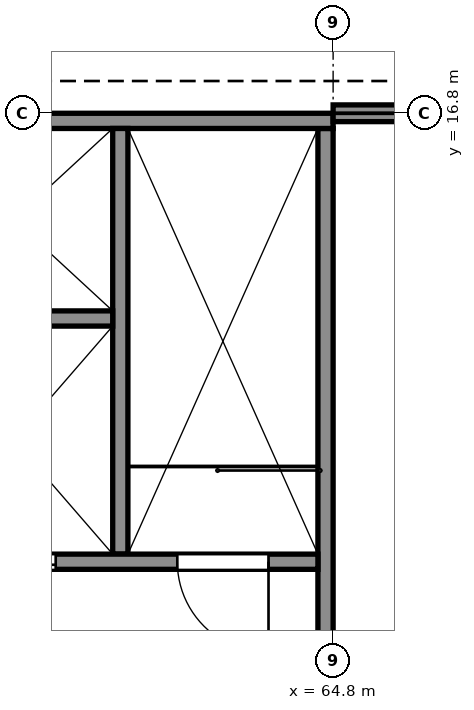
"""IFC4 building model, lengths in metres.
Left out: names, types, materials, properties, quantities, classifications, styles, units other than length and angle.
Written with IfcOpenShell. Run it as: python <this file> out.ifc"""

import sys

from ifc_helpers import new_model, si_unit, direction, frame, frame_2d, origin, place, context, subcontext, project, spatial, polyline, rectangle, outline, extrude, element, fill, save


model = new_model("IFC4")
c1 = context("Model", 3, precision=1e-05, world=origin(), true_north=direction((0.0, 1.0)))
c2 = subcontext(c1, "Body", "Model", "MODEL_VIEW")
j1 = project(units=[si_unit("LENGTHUNIT", "METRE"), si_unit("PLANEANGLEUNIT", "RADIAN")], contexts=[c1])
p1 = place(None, origin())
s1 = spatial("IfcSite", under=j1, at=p1, CompositionType="ELEMENT")
p2 = place(p1, origin())
s2 = spatial("IfcBuilding", under=s1, at=p2, CompositionType="ELEMENT")
p3 = place(p2, frame((0.0, 0.0, 25.0)))
s3 = spatial("IfcBuildingStorey", under=s2, at=p3, CompositionType="ELEMENT", Elevation=25.0)
p4 = place(p3, frame((56.4, 16.7, 0.0), z_axis=(0.0, 0.0, 1.0), x_axis=(1.0, 0.0, 0.0)))
e1 = element("IfcWall", 1, at=p4, inside=s3, PredefinedType="SHEAR", context=c2, shape_type="SweptSolid", body=[
    extrude(rectangle(XDim=8.4, YDim=0.2, at=frame_2d((4.2, 0.0))), origin(), (0.0, 0.0, 1.0), 4.433),
])
p5 = place(p3, frame((64.7, 8.6, 0.0), z_axis=(0.0, 0.0, 1.0), x_axis=(0.0, 1.0, 0.0)))
e2 = element("IfcWall", 2, at=p5, inside=s3, PredefinedType="SHEAR", context=c2, shape_type="SweptSolid", body=[
    extrude(outline(polyline([(0.0, 0.0), (8.0, 0.0), (8.0, 4.465), (7.704, 4.561), (7.407, 4.658), (6.519, 4.946), (6.222, 5.043), (5.333, 5.331), (5.037, 5.428), (4.444, 5.62), (4.148, 5.717), (3.259, 6.005), (2.963, 6.102), (2.074, 6.39), (1.778, 6.487), (1.185, 6.679), (0.889, 6.776), (0.0, 7.064), (0.0, 0.0)])), frame((0.0, 0.1, 0.0), z_axis=(0.0, -1.0, 0.0), x_axis=(1.0, 0.0, 0.0)), (0.0, 0.0, 1.0), 0.2),
])
p6 = place(p3, frame((56.6, 10.9, 0.0), z_axis=(0.0, 0.0, 1.0), x_axis=(1.0, 0.0, 0.0)))
e3 = element("IfcWall", 3, at=p6, inside=s3, PredefinedType="SHEAR", context=c2, shape_type="SweptSolid", body=[
    extrude(rectangle(XDim=8.0, YDim=0.2, at=frame_2d((4.0, 0.0))), origin(), (0.0, 0.0, 1.0), 6.317),
])
p7 = place(p6, frame((0.65, 0.0, 0.0)))
e4 = element("IfcOpeningElement", 4, at=p7, cuts=e3, PredefinedType="OPENING", context=c2, shape_type="SweptSolid", body=[
    extrude(rectangle(XDim=1.2, YDim=2.1, at=frame_2d((0.6, 1.05))), frame((0.0, 0.11, 0.0), z_axis=(0.0, -1.0, 0.0), x_axis=(1.0, 0.0, 0.0)), (0.0, 0.0, 1.0), 0.22),
])
p8 = place(p6, frame((6.15, 0.0, 0.0)))
e5 = element("IfcOpeningElement", 5, at=p8, cuts=e3, PredefinedType="OPENING", context=c2, shape_type="SweptSolid", body=[
    extrude(rectangle(XDim=1.2, YDim=2.1, at=frame_2d((0.6, 1.05))), frame((0.0, 0.11, 0.0), z_axis=(0.0, -1.0, 0.0), x_axis=(1.0, 0.0, 0.0)), (0.0, 0.0, 1.0), 0.22),
])
p9 = place(p6, frame((3.45, 0.0, 0.0)))
e6 = element("IfcOpeningElement", 6, at=p9, cuts=e3, PredefinedType="OPENING", context=c2, shape_type="SweptSolid", body=[
    extrude(rectangle(XDim=1.1, YDim=2.1, at=frame_2d((0.55, 1.05))), frame((0.0, 0.11, 0.0), z_axis=(0.0, -1.0, 0.0), x_axis=(1.0, 0.0, 0.0)), (0.0, 0.0, 1.0), 0.22),
])
p10 = place(p3, frame((62.0, 11.0, 0.0), z_axis=(0.0, 0.0, 1.0), x_axis=(0.0, 1.0, 0.0)))
e7 = element("IfcWall", 7, at=p10, inside=s3, PredefinedType="SHEAR", context=c2, shape_type="SweptSolid", body=[
    extrude(outline(polyline([(0.0, 0.0), (5.6, 0.0), (5.6, 4.465), (5.01, 4.657), (4.716, 4.752), (3.832, 5.04), (3.537, 5.135), (2.653, 5.423), (2.358, 5.518), (1.474, 5.806), (1.179, 5.901), (0.0, 6.285), (0.0, 0.0)])), frame((0.0, 0.1, 0.0), z_axis=(0.0, -1.0, 0.0), x_axis=(1.0, 0.0, 0.0)), (0.0, 0.0, 1.0), 0.2),
])
p11 = place(p3, frame((59.3, 14.1, 0.0), z_axis=(0.0, 0.0, 1.0), x_axis=(1.0, 0.0, 0.0)))
e8 = element("IfcWall", 8, at=p11, inside=s3, PredefinedType="SHEAR", context=c2, shape_type="SweptSolid", body=[
    extrude(rectangle(XDim=2.6, YDim=0.2, at=frame_2d((1.3, 0.0))), origin(), (0.0, 0.0, 1.0), 5.278),
])
p12 = place(p3, frame((64.8, 16.8, 0.0), z_axis=(0.0, 0.0, 1.0), x_axis=(1.0, 0.0, 0.0)))
e9 = element("IfcWall", 9, at=p12, inside=s3, PredefinedType="SOLIDWALL", context=c2, shape_type="SweptSolid", body=[
    extrude(rectangle(XDim=8.1, YDim=0.22, at=frame_2d((4.05, 0.0))), origin(), (0.0, 0.0, 1.0), 4.334),
])
p13 = place(p12, frame((2.25, 0.0, 0.9)))
e10 = element("IfcOpeningElement", 10, at=p13, cuts=e9, PredefinedType="OPENING", context=c2, shape_type="SweptSolid", body=[
    extrude(rectangle(XDim=3.6, YDim=1.5, at=frame_2d((1.8, 0.75))), frame((0.0, 0.12, 0.0), z_axis=(0.0, -1.0, 0.0), x_axis=(1.0, 0.0, 0.0)), (0.0, 0.0, 1.0), 0.24),
])
p14 = place(p8, origin())
e11 = element("IfcDoor", 11, at=p14, inside=s3, OperationType="SINGLE_SWING_RIGHT", PredefinedType="DOOR", context=c2, shape_type="SweptSolid", body=[
    extrude(rectangle(XDim=1.2, YDim=2.1, at=frame_2d((0.6, 1.05))), frame((0.0, 0.025, 0.0), z_axis=(0.0, -1.0, 0.0), x_axis=(1.0, 0.0, 0.0)), (0.0, 0.0, 1.0), 0.05),
])
fill(e5, e11)
p15 = place(p9, origin())
e12 = element("IfcDoor", 12, at=p15, inside=s3, OperationType="DOUBLE_DOOR_SLIDING", PredefinedType="DOOR", context=c2, shape_type="SweptSolid", body=[
    extrude(rectangle(XDim=1.1, YDim=2.1, at=frame_2d((0.55, 1.05))), frame((0.0, 0.025, 0.0), z_axis=(0.0, -1.0, 0.0), x_axis=(1.0, 0.0, 0.0)), (0.0, 0.0, 1.0), 0.05),
])
fill(e6, e12)
save(model, sys.argv[1])
